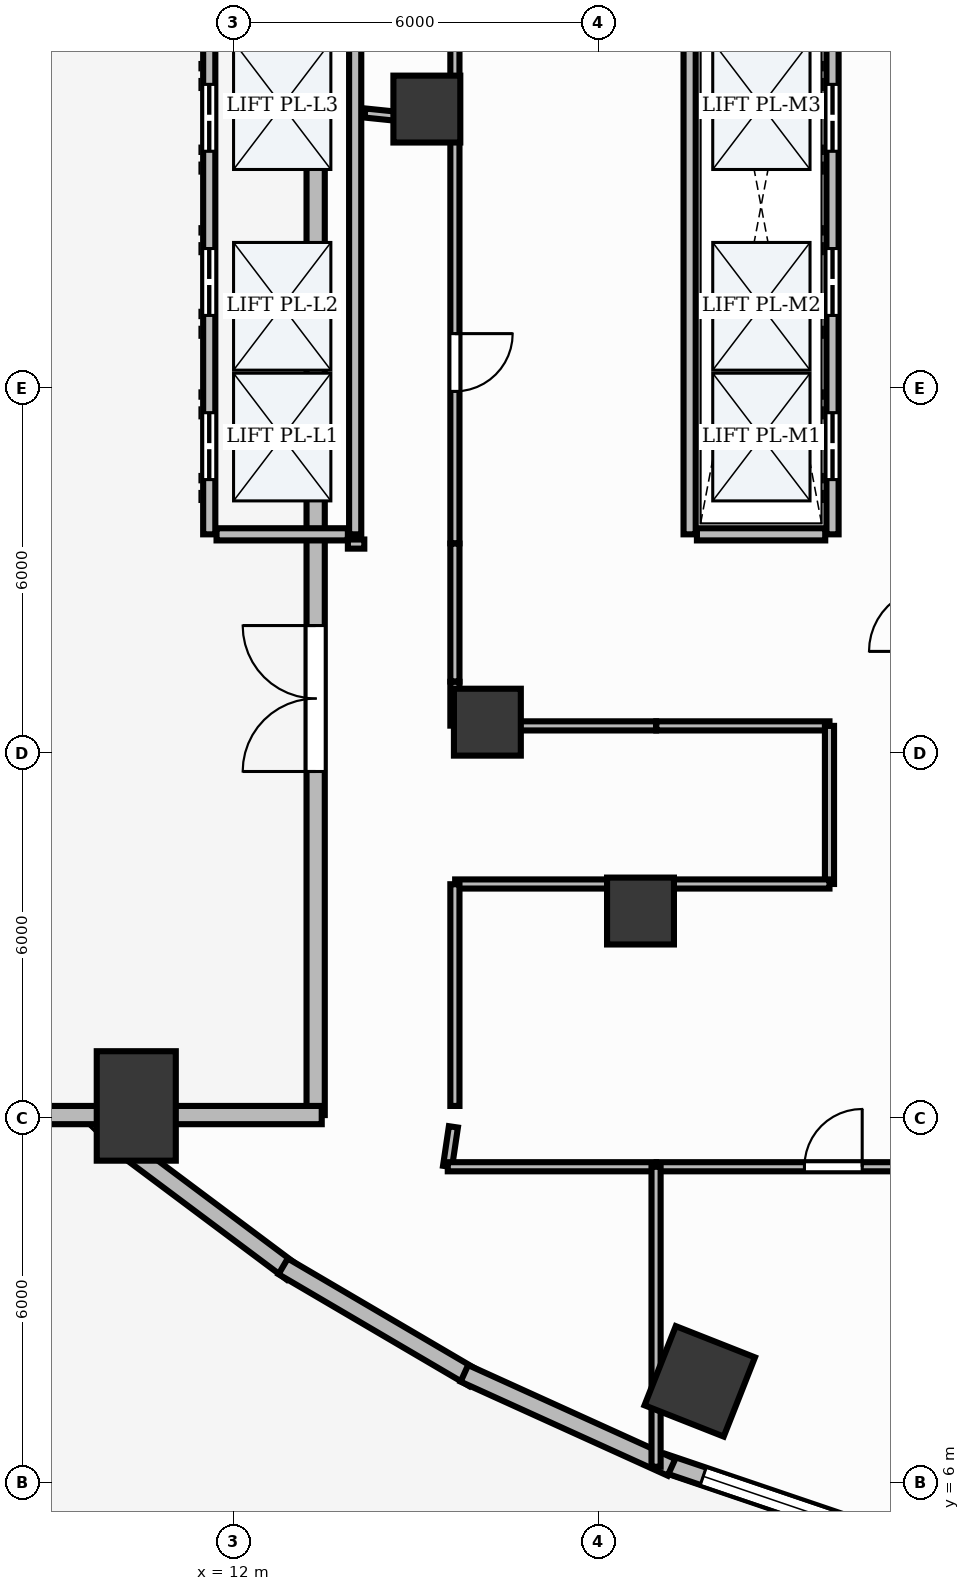
"""IFC4 building model, lengths in metres.
Left out: names, types, materials, properties, quantities, classifications, styles, units other than length and angle.
Written with IfcOpenShell. Run it as: python <this file> out.ifc"""

import sys

from ifc_helpers import new_model, si_unit, direction, frame, frame_2d, origin, origin_2d, place, context, subcontext, project, spatial, rectangle, extrude, element, fill, save


model = new_model("IFC4")
c1 = context("Model", 3, precision=1e-05, world=origin(), true_north=direction((0.0, 1.0)))
c2 = subcontext(c1, "Body", "Model", "MODEL_VIEW")
j1 = project(units=[si_unit("LENGTHUNIT", "METRE"), si_unit("PLANEANGLEUNIT", "RADIAN")], contexts=[c1])
p1 = place(None, origin())
s1 = spatial("IfcSite", under=j1, at=p1, CompositionType="ELEMENT")
p2 = place(p1, origin())
s2 = spatial("IfcBuilding", under=s1, at=p2, CompositionType="ELEMENT")
p3 = place(p2, origin())
s3 = spatial("IfcBuildingStorey", under=s2, at=p3, CompositionType="ELEMENT", Elevation=0.0)
p4 = place(p3, frame((10.4, 12.2, 0.0), z_axis=(0.0, 0.0, 1.0), x_axis=(1.0, 0.0, 0.0)))
e1 = element("IfcColumn", 1, at=p4, inside=s3, PredefinedType="PILASTER", context=c2, shape_type="SweptSolid", body=[
    extrude(rectangle(XDim=1.3, YDim=1.8, at=origin_2d()), origin(), (0.0, 0.0, 1.0), 5.08),
])
for number, where, z_axis, x_axis in (
    (2, (15.179, 28.594, -0.0), (0.0, 0.0, 1.0), (1.0, 0.0, 0.0)),
    (3, (16.174, 18.511, -0.0), (0.0, 0.0, 1.0), (1.0, 0.0, 0.0)),
    (4, (18.692, 15.405, -0.0), (0.0, 0.0, 1.0), (1.0, 0.0, 0.0)),
):
    element("IfcColumn", number, at=place(p3, frame(where, z_axis=z_axis, x_axis=x_axis)), inside=s3, PredefinedType="COLUMN", context=c2, shape_type="SweptSolid", body=[
        extrude(rectangle(XDim=1.1, YDim=1.1, at=origin_2d()), origin(), (0.0, 0.0, 1.0), 5.101),
    ])
p5 = place(p3, frame((19.667, 7.671, -0.0), z_axis=(0.0, 0.0, 1.0), x_axis=(-0.930225540858, 0.366988341962, 0.0)))
e5 = element("IfcColumn", 5, at=p5, inside=s3, PredefinedType="COLUMN", context=c2, shape_type="SweptSolid", body=[
    extrude(rectangle(XDim=1.4, YDim=1.4, at=origin_2d()), origin(), (0.0, 0.0, 1.0), 5.101),
])
p6 = place(p3, frame((19.065, 6.333, 0.0), z_axis=(0.0, 0.0, 1.0), x_axis=(0.947034337234, -0.321132315564, 0.0)))
e6 = element("IfcWall", 6, at=p6, inside=s3, PredefinedType="STANDARD", context=c2, shape_type="SweptSolid", body=[
    extrude(rectangle(XDim=3.79, YDim=0.3, at=frame_2d((1.895, 0.0))), origin(), (0.0, 0.0, 1.0), 5.1),
])
p7 = place(p6, frame((0.695, 0.0, 1.5)))
e7 = element("IfcOpeningElement", 7, at=p7, cuts=e6, PredefinedType="OPENING", context=c2, shape_type="SweptSolid", body=[
    extrude(rectangle(XDim=2.4, YDim=1.2, at=frame_2d((1.2, 0.6))), frame((0.0, 0.165, 0.0), z_axis=(0.0, -1.0, 0.0), x_axis=(1.0, 0.0, 0.0)), (0.0, 0.0, 1.0), 0.33),
])
p8 = place(p3, frame((10.142, 11.573, 0.0), z_axis=(0.0, 0.0, 1.0), x_axis=(0.800823020995, -0.598901067827, 0.0)))
e8 = element("IfcWall", 8, at=p8, inside=s3, PredefinedType="STANDARD", context=c2, shape_type="SweptSolid", body=[
    extrude(rectangle(XDim=3.521, YDim=0.3, at=frame_2d((1.76, 0.0))), origin(), (0.0, 0.0, 1.0), 5.1),
])
p9 = place(p3, frame((12.815, 9.562, 0.0), z_axis=(0.0, 0.0, 1.0), x_axis=(0.8624654944, -0.506115867139, 0.0)))
e9 = element("IfcWall", 9, at=p9, inside=s3, PredefinedType="STANDARD", context=c2, shape_type="SweptSolid", body=[
    extrude(rectangle(XDim=3.635, YDim=0.3, at=frame_2d((1.818, 0.0))), origin(), (0.0, 0.0, 1.0), 5.1),
])
p10 = place(p3, frame((15.796, 7.802, 0.0), z_axis=(0.0, 0.0, 1.0), x_axis=(0.910623406862, -0.413237233166, 0.0)))
e10 = element("IfcWall", 10, at=p10, inside=s3, PredefinedType="STANDARD", context=c2, shape_type="SweptSolid", body=[
    extrude(rectangle(XDim=3.74, YDim=0.3, at=frame_2d((1.87, 0.0))), origin(), (0.0, 0.0, 1.0), 5.1),
])
p11 = place(p3, frame((13.35, 12.05, 0.0), z_axis=(0.0, 0.0, 1.0), x_axis=(0.0, 1.0, 0.0)))
e11 = element("IfcWall", 11, at=p11, inside=s3, PredefinedType="STANDARD", context=c2, shape_type="SweptSolid", body=[
    extrude(rectangle(XDim=29.9, YDim=0.3, at=frame_2d((14.95, 0.0))), origin(), (0.0, 0.0, 1.0), 5.1),
])
p12 = place(p11, frame((5.65, 0.0, 0.0)))
e12 = element("IfcOpeningElement", 12, at=p12, cuts=e11, PredefinedType="OPENING", context=c2, shape_type="SweptSolid", body=[
    extrude(rectangle(XDim=2.4, YDim=2.7, at=frame_2d((1.2, 1.35))), frame((0.0, 0.165, 0.0), z_axis=(0.0, -1.0, 0.0), x_axis=(1.0, 0.0, 0.0)), (0.0, 0.0, 1.0), 0.33),
])
p13 = place(p11, frame((21.65, 0.0, 0.0)))
e13 = element("IfcOpeningElement", 13, at=p13, cuts=e11, PredefinedType="OPENING", context=c2, shape_type="SweptSolid", body=[
    extrude(rectangle(XDim=2.4, YDim=2.7, at=frame_2d((1.2, 1.35))), frame((0.0, 0.165, 0.0), z_axis=(0.0, -1.0, 0.0), x_axis=(1.0, 0.0, 0.0)), (0.0, 0.0, 1.0), 0.33),
])
p14 = place(p3, frame((8.6, 12.05, 0.0), z_axis=(0.0, 0.0, 1.0), x_axis=(1.0, 0.0, 0.0)))
e14 = element("IfcWall", 14, at=p14, inside=s3, PredefinedType="STANDARD", context=c2, shape_type="SweptSolid", body=[
    extrude(rectangle(XDim=4.85, YDim=0.3, at=frame_2d((2.425, 0.0))), origin(), (0.0, 0.0, 1.0), 5.1),
])
p15 = place(p3, frame((11.6, 21.6, 0.0), z_axis=(0.0, 0.0, 1.0), x_axis=(0.0, 1.0, 0.0)))
e15 = element("IfcWall", 15, at=p15, inside=s3, PredefinedType="PARTITIONING", context=c2, shape_type="SweptSolid", body=[
    extrude(rectangle(XDim=10.8, YDim=0.2, at=frame_2d((5.4, 0.0))), origin(), (0.0, 0.0, 1.0), 4.11),
])
p16 = place(p15, frame((0.9, 0.0, 0.0)))
e16 = element("IfcOpeningElement", 16, at=p16, cuts=e15, PredefinedType="OPENING", context=c2, shape_type="SweptSolid", body=[
    extrude(rectangle(XDim=1.1, YDim=2.2, at=frame_2d((0.55, 1.1))), frame((0.0, 0.115, 0.0), z_axis=(0.0, -1.0, 0.0), x_axis=(1.0, 0.0, 0.0)), (0.0, 0.0, 1.0), 0.23),
])
p17 = place(p15, frame((3.6, 0.0, 0.0)))
e17 = element("IfcOpeningElement", 17, at=p17, cuts=e15, PredefinedType="OPENING", context=c2, shape_type="SweptSolid", body=[
    extrude(rectangle(XDim=1.1, YDim=2.2, at=frame_2d((0.55, 1.1))), frame((0.0, 0.115, 0.0), z_axis=(0.0, -1.0, 0.0), x_axis=(1.0, 0.0, 0.0)), (0.0, 0.0, 1.0), 0.23),
])
p18 = place(p15, frame((6.3, 0.0, 0.0)))
e18 = element("IfcOpeningElement", 18, at=p18, cuts=e15, PredefinedType="OPENING", context=c2, shape_type="SweptSolid", body=[
    extrude(rectangle(XDim=1.1, YDim=2.2, at=frame_2d((0.55, 1.1))), frame((0.0, 0.115, 0.0), z_axis=(0.0, -1.0, 0.0), x_axis=(1.0, 0.0, 0.0)), (0.0, 0.0, 1.0), 0.23),
])
p19 = place(p15, frame((9.0, 0.0, 0.0)))
e19 = element("IfcOpeningElement", 19, at=p19, cuts=e15, PredefinedType="OPENING", context=c2, shape_type="SweptSolid", body=[
    extrude(rectangle(XDim=1.1, YDim=2.2, at=frame_2d((0.55, 1.1))), frame((0.0, 0.115, 0.0), z_axis=(0.0, -1.0, 0.0), x_axis=(1.0, 0.0, 0.0)), (0.0, 0.0, 1.0), 0.23),
])
p20 = place(p3, frame((14.0, 21.6, 0.0), z_axis=(0.0, 0.0, 1.0), x_axis=(0.0, 1.0, 0.0)))
e20 = element("IfcWall", 20, at=p20, inside=s3, PredefinedType="PARTITIONING", context=c2, shape_type="SweptSolid", body=[
    extrude(rectangle(XDim=10.8, YDim=0.2, at=frame_2d((5.4, 0.0))), origin(), (0.0, 0.0, 1.0), 4.11),
])
p21 = place(p3, frame((11.72, 21.6, 0.0), z_axis=(0.0, 0.0, 1.0), x_axis=(1.0, 0.0, 0.0)))
e21 = element("IfcWall", 21, at=p21, inside=s3, PredefinedType="PARTITIONING", context=c2, shape_type="SweptSolid", body=[
    extrude(rectangle(XDim=2.16, YDim=0.2, at=frame_2d((1.08, 0.0))), origin(), (0.0, 0.0, 1.0), 4.11),
])
p22 = place(p3, frame((19.5, 21.6, 0.0), z_axis=(0.0, 0.0, 1.0), x_axis=(0.0, 1.0, 0.0)))
e22 = element("IfcWall", 22, at=p22, inside=s3, PredefinedType="PARTITIONING", context=c2, shape_type="SweptSolid", body=[
    extrude(rectangle(XDim=10.8, YDim=0.2, at=frame_2d((5.4, 0.0))), origin(), (0.0, 0.0, 1.0), 4.11),
])
p23 = place(p3, frame((21.85, 21.6, 0.0), z_axis=(0.0, 0.0, 1.0), x_axis=(0.0, 1.0, 0.0)))
e23 = element("IfcWall", 23, at=p23, inside=s3, PredefinedType="PARTITIONING", context=c2, shape_type="SweptSolid", body=[
    extrude(rectangle(XDim=10.8, YDim=0.2, at=frame_2d((5.4, 0.0))), origin(), (0.0, 0.0, 1.0), 4.11),
])
p24 = place(p23, frame((0.9, 0.0, 0.0)))
e24 = element("IfcOpeningElement", 24, at=p24, cuts=e23, PredefinedType="OPENING", context=c2, shape_type="SweptSolid", body=[
    extrude(rectangle(XDim=1.1, YDim=2.2, at=frame_2d((0.55, 1.1))), frame((0.0, 0.115, 0.0), z_axis=(0.0, -1.0, 0.0), x_axis=(1.0, 0.0, 0.0)), (0.0, 0.0, 1.0), 0.23),
])
p25 = place(p23, frame((3.6, 0.0, 0.0)))
e25 = element("IfcOpeningElement", 25, at=p25, cuts=e23, PredefinedType="OPENING", context=c2, shape_type="SweptSolid", body=[
    extrude(rectangle(XDim=1.1, YDim=2.2, at=frame_2d((0.55, 1.1))), frame((0.0, 0.115, 0.0), z_axis=(0.0, -1.0, 0.0), x_axis=(1.0, 0.0, 0.0)), (0.0, 0.0, 1.0), 0.23),
])
p26 = place(p23, frame((6.3, 0.0, 0.0)))
e26 = element("IfcOpeningElement", 26, at=p26, cuts=e23, PredefinedType="OPENING", context=c2, shape_type="SweptSolid", body=[
    extrude(rectangle(XDim=1.1, YDim=2.2, at=frame_2d((0.55, 1.1))), frame((0.0, 0.115, 0.0), z_axis=(0.0, -1.0, 0.0), x_axis=(1.0, 0.0, 0.0)), (0.0, 0.0, 1.0), 0.23),
])
p27 = place(p23, frame((9.0, 0.0, 0.0)))
e27 = element("IfcOpeningElement", 27, at=p27, cuts=e23, PredefinedType="OPENING", context=c2, shape_type="SweptSolid", body=[
    extrude(rectangle(XDim=1.1, YDim=2.2, at=frame_2d((0.55, 1.1))), frame((0.0, 0.115, 0.0), z_axis=(0.0, -1.0, 0.0), x_axis=(1.0, 0.0, 0.0)), (0.0, 0.0, 1.0), 0.23),
])
p28 = place(p3, frame((19.62, 21.6, 0.0), z_axis=(0.0, 0.0, 1.0), x_axis=(1.0, 0.0, 0.0)))
e28 = element("IfcWall", 28, at=p28, inside=s3, PredefinedType="PARTITIONING", context=c2, shape_type="SweptSolid", body=[
    extrude(rectangle(XDim=2.11, YDim=0.2, at=frame_2d((1.055, 0.0))), origin(), (0.0, 0.0, 1.0), 4.11),
])
p29 = place(p3, frame((15.64, 28.376, 0.0), z_axis=(0.0, 0.0, 1.0), x_axis=(0.0, -1.0, 0.0)))
e29 = element("IfcWall", 29, at=p29, inside=s3, PredefinedType="PARTITIONING", context=c2, shape_type="SweptSolid", body=[
    extrude(rectangle(XDim=6.924, YDim=0.15, at=frame_2d((3.462, 0.0))), origin(), (0.0, 0.0, 1.0), 4.11),
])
p30 = place(p29, frame((3.475, 0.0, 0.0)))
e30 = element("IfcOpeningElement", 30, at=p30, cuts=e29, PredefinedType="OPENING", context=c2, shape_type="SweptSolid", body=[
    extrude(rectangle(XDim=0.95, YDim=2.15, at=frame_2d((0.475, 1.075))), frame((0.0, 0.09, 0.0), z_axis=(0.0, -1.0, 0.0), x_axis=(1.0, 0.0, 0.0)), (0.0, 0.0, 1.0), 0.18),
])
p31 = place(p3, frame((18.958, 11.2, 0.0), z_axis=(0.0, 0.0, 1.0), x_axis=(1.0, 0.0, 0.0)))
e31 = element("IfcWall", 31, at=p31, inside=s3, PredefinedType="PARTITIONING", context=c2, shape_type="SweptSolid", body=[
    extrude(rectangle(XDim=5.183, YDim=0.15, at=frame_2d((2.591, 0.0))), origin(), (0.0, 0.0, 1.0), 4.11),
])
p32 = place(p31, frame((2.43, 0.0, 0.0)))
e32 = element("IfcOpeningElement", 32, at=p32, cuts=e31, PredefinedType="OPENING", context=c2, shape_type="SweptSolid", body=[
    extrude(rectangle(XDim=0.95, YDim=2.15, at=frame_2d((0.475, 1.075))), frame((0.0, 0.09, 0.0), z_axis=(0.0, -1.0, 0.0), x_axis=(1.0, 0.0, 0.0)), (0.0, 0.0, 1.0), 0.18),
])
p33 = place(p3, frame((15.64, 33.398, 0.0), z_axis=(0.0, 0.0, 1.0), x_axis=(0.0, -1.0, 0.0)))
e33 = element("IfcWall", 33, at=p33, inside=s3, PredefinedType="PARTITIONING", context=c2, shape_type="SweptSolid", body=[
    extrude(rectangle(XDim=5.012, YDim=0.15, at=frame_2d((2.506, 0.0))), origin(), (0.0, 0.0, 1.0), 4.11),
])
p34 = place(p33, frame((0.825, 0.0, 0.0)))
e34 = element("IfcOpeningElement", 34, at=p34, cuts=e33, PredefinedType="OPENING", context=c2, shape_type="SweptSolid", body=[
    extrude(rectangle(XDim=0.95, YDim=2.15, at=frame_2d((0.475, 1.075))), frame((0.0, 0.09, 0.0), z_axis=(0.0, -1.0, 0.0), x_axis=(1.0, 0.0, 0.0)), (0.0, 0.0, 1.0), 0.18),
])
p35 = place(p3, frame((13.88, 21.44, 0.0), z_axis=(0.0, 0.0, 1.0), x_axis=(1.0, 0.0, 0.0)))
e35 = element("IfcWall", 35, at=p35, inside=s3, PredefinedType="PARTITIONING", context=c2, shape_type="SweptSolid", body=[
    extrude(rectangle(XDim=0.27, YDim=0.15, at=frame_2d((0.135, 0.0))), origin(), (0.0, 0.0, 1.0), 4.11),
])
p36 = place(p3, frame((14.16, 28.529, 0.0), z_axis=(0.0, 0.0, 1.0), x_axis=(0.994708578353, -0.102736771168, 0.0)))
e36 = element("IfcWall", 36, at=p36, inside=s3, PredefinedType="PARTITIONING", context=c2, shape_type="SweptSolid", body=[
    extrude(rectangle(XDim=1.488, YDim=0.15, at=frame_2d((0.744, 0.0))), origin(), (0.0, 0.0, 1.0), 4.11),
])
p37 = place(p3, frame((15.64, 21.448, 0.0), z_axis=(0.0, 0.0, 1.0), x_axis=(0.0, -1.0, 0.0)))
e37 = element("IfcWall", 37, at=p37, inside=s3, PredefinedType="PARTITIONING", context=c2, shape_type="SweptSolid", body=[
    extrude(rectangle(XDim=2.268, YDim=0.15, at=frame_2d((1.134, 0.0))), origin(), (0.0, 0.0, 1.0), 4.11),
])
p38 = place(p3, frame((15.64, 19.175, 0.0), z_axis=(0.0, 0.0, 1.0), x_axis=(0.0, -1.0, 0.0)))
e38 = element("IfcWall", 38, at=p38, inside=s3, PredefinedType="PARTITIONING", context=c2, shape_type="SweptSolid", body=[
    extrude(rectangle(XDim=0.721, YDim=0.15, at=frame_2d((0.36, 0.0))), origin(), (0.0, 0.0, 1.0), 4.11),
])
p39 = place(p3, frame((15.644, 18.45, 0.0), z_axis=(0.0, 0.0, 1.0), x_axis=(1.0, 0.0, 0.0)))
e39 = element("IfcWall", 39, at=p39, inside=s3, PredefinedType="PARTITIONING", context=c2, shape_type="SweptSolid", body=[
    extrude(rectangle(XDim=3.304, YDim=0.15, at=frame_2d((1.652, 0.0))), origin(), (0.0, 0.0, 1.0), 4.11),
])
p40 = place(p3, frame((18.952, 18.45, 0.0), z_axis=(0.0, 0.0, 1.0), x_axis=(1.0, 0.0, 0.0)))
e40 = element("IfcWall", 40, at=p40, inside=s3, PredefinedType="PARTITIONING", context=c2, shape_type="SweptSolid", body=[
    extrude(rectangle(XDim=2.848, YDim=0.15, at=frame_2d((1.424, 0.0))), origin(), (0.0, 0.0, 1.0), 4.11),
])
p41 = place(p3, frame((21.8, 18.45, 0.0), z_axis=(0.0, 0.0, 1.0), x_axis=(0.0, -1.0, 0.0)))
e41 = element("IfcWall", 41, at=p41, inside=s3, PredefinedType="PARTITIONING", context=c2, shape_type="SweptSolid", body=[
    extrude(rectangle(XDim=2.6, YDim=0.15, at=frame_2d((1.3, 0.0))), origin(), (0.0, 0.0, 1.0), 4.11),
])
p42 = place(p3, frame((21.8, 15.85, 0.0), z_axis=(0.0, 0.0, 1.0), x_axis=(-1.0, 0.0, 0.0)))
e42 = element("IfcWall", 42, at=p42, inside=s3, PredefinedType="PARTITIONING", context=c2, shape_type="SweptSolid", body=[
    extrude(rectangle(XDim=2.848, YDim=0.15, at=frame_2d((1.424, 0.0))), origin(), (0.0, 0.0, 1.0), 4.11),
])
p43 = place(p3, frame((18.948, 15.85, 0.0), z_axis=(0.0, 0.0, 1.0), x_axis=(-1.0, 0.0, 0.0)))
e43 = element("IfcWall", 43, at=p43, inside=s3, PredefinedType="PARTITIONING", context=c2, shape_type="SweptSolid", body=[
    extrude(rectangle(XDim=3.304, YDim=0.15, at=frame_2d((1.652, 0.0))), origin(), (0.0, 0.0, 1.0), 4.11),
])
p44 = place(p3, frame((15.64, 15.846, 0.0), z_axis=(0.0, 0.0, 1.0), x_axis=(0.0, -1.0, 0.0)))
e44 = element("IfcWall", 44, at=p44, inside=s3, PredefinedType="PARTITIONING", context=c2, shape_type="SweptSolid", body=[
    extrude(rectangle(XDim=3.646, YDim=0.15, at=frame_2d((1.823, 0.0))), origin(), (0.0, 0.0, 1.0), 4.11),
])
p45 = place(p3, frame((15.615, 11.856, 0.0), z_axis=(0.0, 0.0, 1.0), x_axis=(-0.146454599024, -0.989217392904, 0.0)))
e45 = element("IfcWall", 45, at=p45, inside=s3, PredefinedType="PARTITIONING", context=c2, shape_type="SweptSolid", body=[
    extrude(rectangle(XDim=0.658, YDim=0.15, at=frame_2d((0.329, 0.0))), origin(), (0.0, 0.0, 1.0), 4.11),
])
p46 = place(p3, frame((15.523, 11.2, 0.0), z_axis=(0.0, 0.0, 1.0), x_axis=(1.0, 0.0, 0.0)))
e46 = element("IfcWall", 46, at=p46, inside=s3, PredefinedType="PARTITIONING", context=c2, shape_type="SweptSolid", body=[
    extrude(rectangle(XDim=3.425, YDim=0.15, at=frame_2d((1.712, 0.0))), origin(), (0.0, 0.0, 1.0), 4.11),
])
p47 = place(p3, frame((18.948, 11.2, 0.0), z_axis=(0.0, 0.0, 1.0), x_axis=(0.0, -1.0, 0.0)))
e47 = element("IfcWall", 47, at=p47, inside=s3, PredefinedType="PARTITIONING", context=c2, shape_type="SweptSolid", body=[
    extrude(rectangle(XDim=4.933, YDim=0.15, at=frame_2d((2.467, 0.0))), origin(), (0.0, 0.0, 1.0), 4.11),
])
p48 = place(p7, origin())
e48 = element("IfcWindow", 48, at=p48, inside=s3, PartitioningType="DOUBLE_PANEL_HORIZONTAL", PredefinedType="WINDOW", context=c2, shape_type="SweptSolid", body=[
    extrude(rectangle(XDim=2.4, YDim=1.2, at=frame_2d((1.2, 0.6))), frame((0.0, 0.03, 0.0), z_axis=(0.0, -1.0, 0.0), x_axis=(1.0, 0.0, 0.0)), (0.0, 0.0, 1.0), 0.06),
])
fill(e7, e48)
p49 = place(p12, origin())
e49 = element("IfcDoor", 49, at=p49, inside=s3, OperationType="DOUBLE_DOOR_SINGLE_SWING", PredefinedType="DOOR", context=c2, shape_type="SweptSolid", body=[
    extrude(rectangle(XDim=2.4, YDim=2.7, at=frame_2d((1.2, 1.35))), frame((0.0, 0.025, 0.0), z_axis=(0.0, -1.0, 0.0), x_axis=(1.0, 0.0, 0.0)), (0.0, 0.0, 1.0), 0.05),
])
fill(e12, e49)
p50 = place(p16, origin())
e50 = element("IfcDoor", 50, at=p50, inside=s3, OperationType="DOUBLE_DOOR_SLIDING", PredefinedType="DOOR", context=c2, shape_type="SweptSolid", body=[
    extrude(rectangle(XDim=1.1, YDim=2.2, at=frame_2d((0.55, 1.1))), frame((0.0, 0.025, 0.0), z_axis=(0.0, -1.0, 0.0), x_axis=(1.0, 0.0, 0.0)), (0.0, 0.0, 1.0), 0.05),
])
fill(e16, e50)
p51 = place(p17, origin())
e51 = element("IfcDoor", 51, at=p51, inside=s3, OperationType="DOUBLE_DOOR_SLIDING", PredefinedType="DOOR", context=c2, shape_type="SweptSolid", body=[
    extrude(rectangle(XDim=1.1, YDim=2.2, at=frame_2d((0.55, 1.1))), frame((0.0, 0.025, 0.0), z_axis=(0.0, -1.0, 0.0), x_axis=(1.0, 0.0, 0.0)), (0.0, 0.0, 1.0), 0.05),
])
fill(e17, e51)
p52 = place(p18, origin())
e52 = element("IfcDoor", 52, at=p52, inside=s3, OperationType="DOUBLE_DOOR_SLIDING", PredefinedType="DOOR", context=c2, shape_type="SweptSolid", body=[
    extrude(rectangle(XDim=1.1, YDim=2.2, at=frame_2d((0.55, 1.1))), frame((0.0, 0.025, 0.0), z_axis=(0.0, -1.0, 0.0), x_axis=(1.0, 0.0, 0.0)), (0.0, 0.0, 1.0), 0.05),
])
fill(e18, e52)
p53 = place(p24, origin())
e53 = element("IfcDoor", 53, at=p53, inside=s3, OperationType="DOUBLE_DOOR_SLIDING", PredefinedType="DOOR", context=c2, shape_type="SweptSolid", body=[
    extrude(rectangle(XDim=1.1, YDim=2.2, at=frame_2d((0.55, 1.1))), frame((0.0, 0.025, 0.0), z_axis=(0.0, -1.0, 0.0), x_axis=(1.0, 0.0, 0.0)), (0.0, 0.0, 1.0), 0.05),
])
fill(e24, e53)
p54 = place(p25, origin())
e54 = element("IfcDoor", 54, at=p54, inside=s3, OperationType="DOUBLE_DOOR_SLIDING", PredefinedType="DOOR", context=c2, shape_type="SweptSolid", body=[
    extrude(rectangle(XDim=1.1, YDim=2.2, at=frame_2d((0.55, 1.1))), frame((0.0, 0.025, 0.0), z_axis=(0.0, -1.0, 0.0), x_axis=(1.0, 0.0, 0.0)), (0.0, 0.0, 1.0), 0.05),
])
fill(e25, e54)
p55 = place(p26, origin())
e55 = element("IfcDoor", 55, at=p55, inside=s3, OperationType="DOUBLE_DOOR_SLIDING", PredefinedType="DOOR", context=c2, shape_type="SweptSolid", body=[
    extrude(rectangle(XDim=1.1, YDim=2.2, at=frame_2d((0.55, 1.1))), frame((0.0, 0.025, 0.0), z_axis=(0.0, -1.0, 0.0), x_axis=(1.0, 0.0, 0.0)), (0.0, 0.0, 1.0), 0.05),
])
fill(e26, e55)
p56 = place(p30, origin())
e56 = element("IfcDoor", 56, at=p56, inside=s3, OperationType="SINGLE_SWING_LEFT", PredefinedType="DOOR", context=c2, shape_type="SweptSolid", body=[
    extrude(rectangle(XDim=0.95, YDim=2.15, at=frame_2d((0.475, 1.075))), frame((0.0, 0.025, 0.0), z_axis=(0.0, -1.0, 0.0), x_axis=(1.0, 0.0, 0.0)), (0.0, 0.0, 1.0), 0.05),
])
fill(e30, e56)
p57 = place(p32, origin())
e57 = element("IfcDoor", 57, at=p57, inside=s3, OperationType="SINGLE_SWING_RIGHT", PredefinedType="DOOR", context=c2, shape_type="SweptSolid", body=[
    extrude(rectangle(XDim=0.95, YDim=2.15, at=frame_2d((0.475, 1.075))), frame((0.0, 0.025, 0.0), z_axis=(0.0, -1.0, 0.0), x_axis=(1.0, 0.0, 0.0)), (0.0, 0.0, 1.0), 0.05),
])
fill(e32, e57)
save(model, sys.argv[1])
